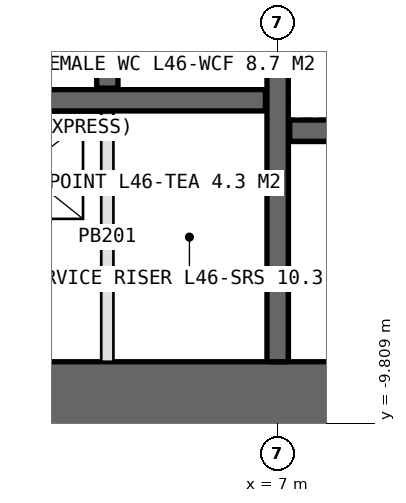
"""IFC4 building model, lengths in metres.
Left out: names, types, materials, properties, quantities, classifications, styles, units other than length and angle.
Written with IfcOpenShell. Run it as: python <this file> out.ifc"""

import sys

from ifc_helpers import new_model, si_unit, direction, frame, frame_2d, origin, place, context, subcontext, project, spatial, rectangle, extrude, element, save


model = new_model("IFC4")
c1 = context("Model", 3, precision=1e-05, world=origin(), true_north=direction((0.0, 1.0)))
c2 = subcontext(c1, "Body", "Model", "MODEL_VIEW")
j1 = project(units=[si_unit("LENGTHUNIT", "METRE"), si_unit("PLANEANGLEUNIT", "RADIAN")], contexts=[c1])
p1 = place(None, origin())
s1 = spatial("IfcSite", under=j1, at=p1, CompositionType="ELEMENT")
p2 = place(p1, origin())
s2 = spatial("IfcBuilding", under=s1, at=p2, CompositionType="ELEMENT")
p3 = place(p2, frame((0.0, 0.0, 211.6)))
s3 = spatial("IfcBuildingStorey", under=s2, at=p3, CompositionType="ELEMENT", Elevation=211.6)
p4 = place(p3, frame((-14.0, -9.4, 0.0), z_axis=(0.0, 0.0, 1.0), x_axis=(1.0, 0.0, 0.0)))
e1 = element("IfcWall", 1, at=p4, inside=s3, PredefinedType="SHEAR", context=c2, shape_type="SweptSolid", body=[
    extrude(rectangle(XDim=28.0, YDim=1.2, at=frame_2d((14.0, 0.0))), origin(), (0.0, 0.0, 1.0), 4.2),
])
p5 = place(p4, frame((22.9, 0.0, 0.0)))
e2 = element("IfcOpeningElement", 2, at=p5, cuts=e1, PredefinedType="OPENING", context=c2, shape_type="SweptSolid", body=[
    extrude(rectangle(XDim=2.2, YDim=2.7, at=frame_2d((1.1, 1.35))), frame((0.0, 0.61, 0.0), z_axis=(0.0, -1.0, 0.0), x_axis=(1.0, 0.0, 0.0)), (0.0, 0.0, 1.0), 1.22),
])
p6 = place(p3, frame((7.0, -8.8, 0.0), z_axis=(0.0, 0.0, 1.0), x_axis=(0.0, 1.0, 0.0)))
e3 = element("IfcWall", 3, at=p6, inside=s3, PredefinedType="SHEAR", context=c2, shape_type="SweptSolid", body=[
    extrude(rectangle(XDim=17.6, YDim=0.35, at=frame_2d((8.8, 0.0))), origin(), (0.0, 0.0, 1.0), 4.2),
])
p7 = place(p6, frame((7.9, 0.0, 0.0)))
e4 = element("IfcOpeningElement", 4, at=p7, cuts=e3, PredefinedType="OPENING", context=c2, shape_type="SweptSolid", body=[
    extrude(rectangle(XDim=1.8, YDim=2.4, at=frame_2d((0.9, 1.2))), frame((0.0, 0.185, 0.0), z_axis=(0.0, -1.0, 0.0), x_axis=(1.0, 0.0, 0.0)), (0.0, 0.0, 1.0), 0.37),
])
p8 = place(p3, frame((-6.8, -4.5, 0.0), z_axis=(0.0, 0.0, 1.0), x_axis=(1.0, 0.0, 0.0)))
e5 = element("IfcWall", 5, at=p8, inside=s3, PredefinedType="SHEAR", context=c2, shape_type="SweptSolid", body=[
    extrude(rectangle(XDim=13.6, YDim=0.35, at=frame_2d((6.8, 0.0))), origin(), (0.0, 0.0, 1.0), 4.2),
])
p9 = place(p3, frame((7.2, -5.0, 0.0), z_axis=(0.0, 0.0, 1.0), x_axis=(1.0, 0.0, 0.0)))
e6 = element("IfcWall", 6, at=p9, inside=s3, PredefinedType="SHEAR", context=c2, shape_type="SweptSolid", body=[
    extrude(rectangle(XDim=5.6, YDim=0.35, at=frame_2d((2.8, 0.0))), origin(), (0.0, 0.0, 1.0), 4.2),
])
p10 = place(p3, frame((4.2, -4.3, 0.0), z_axis=(0.0, 0.0, 1.0), x_axis=(0.0, 1.0, 0.0)))
e7 = element("IfcWall", 7, at=p10, inside=s3, PredefinedType="SHEAR", context=c2, shape_type="SweptSolid", body=[
    extrude(rectangle(XDim=2.5, YDim=0.35, at=frame_2d((1.25, 0.0))), origin(), (0.0, 0.0, 1.0), 4.2),
])
p11 = place(p3, frame((4.2, -4.7, 0.0), z_axis=(0.0, 0.0, 1.0), x_axis=(0.0, -1.0, 0.0)))
e8 = element("IfcWall", 8, at=p11, inside=s3, PredefinedType="PARTITIONING", context=c2, shape_type="SweptSolid", body=[
    extrude(rectangle(XDim=4.1, YDim=0.2, at=frame_2d((2.05, 0.0))), origin(), (0.0, 0.0, 1.0), 4.2),
])
save(model, sys.argv[1])
